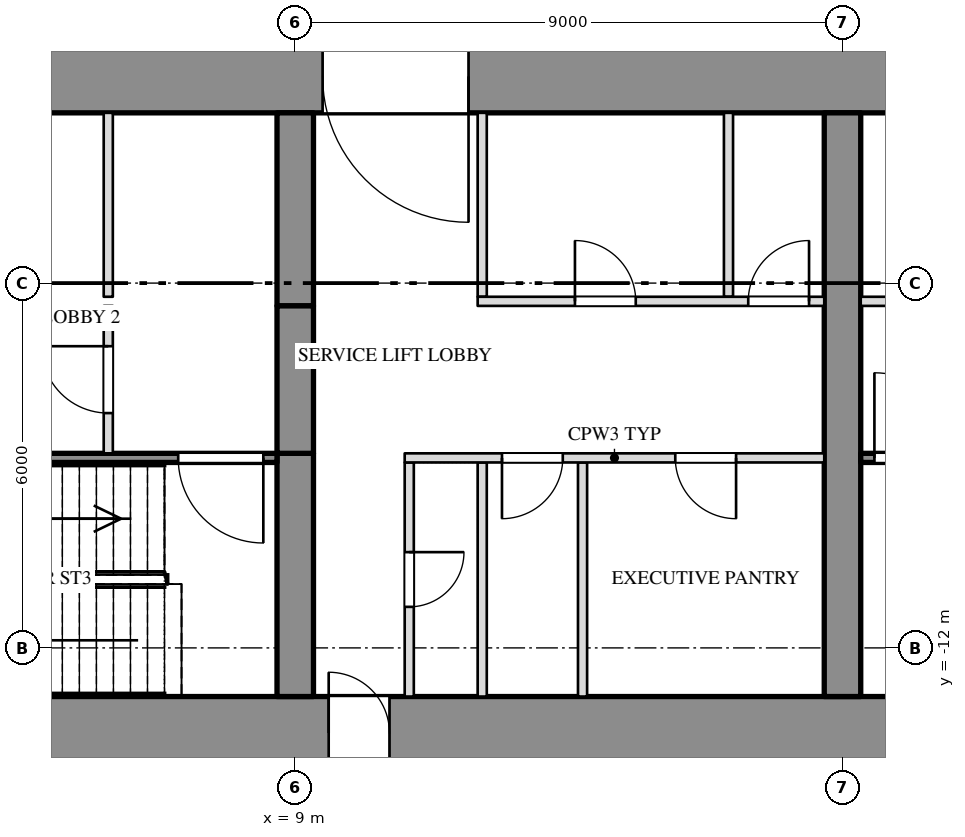
"""IFC4 building model, lengths in metres.
Left out: names, types, materials, properties, quantities, classifications, styles, units other than length and angle.
Written with IfcOpenShell. Run it as: python <this file> out.ifc"""

import sys

from ifc_helpers import new_model, si_unit, direction, frame, frame_2d, origin, place, context, subcontext, project, spatial, rectangle, extrude, element, fill, save


model = new_model("IFC4")
c1 = context("Model", 3, precision=1e-05, world=origin(), true_north=direction((0.0, 1.0)))
c2 = subcontext(c1, "Body", "Model", "MODEL_VIEW")
j1 = project(units=[si_unit("LENGTHUNIT", "METRE"), si_unit("PLANEANGLEUNIT", "RADIAN")], contexts=[c1])
p1 = place(None, origin())
s1 = spatial("IfcSite", under=j1, at=p1, CompositionType="ELEMENT")
p2 = place(p1, origin())
s2 = spatial("IfcBuilding", under=s1, at=p2, CompositionType="ELEMENT")
p3 = place(p2, frame((0.0, 0.0, 39.0)))
s3 = spatial("IfcBuildingStorey", under=s2, at=p3, CompositionType="ELEMENT", Elevation=39.0)
p4 = place(p3, frame((-27.0, -2.6, 0.0), z_axis=(0.0, 0.0, 1.0), x_axis=(1.0, 0.0, 0.0)))
e1 = element("IfcWall", 1, at=p4, inside=s3, PredefinedType="SHEAR", context=c2, shape_type="SweptSolid", body=[
    extrude(rectangle(XDim=54.0, YDim=1.2, at=frame_2d((27.0, 0.0))), origin(), (0.0, 0.0, 1.0), 4.25),
])
p5 = place(p4, frame((15.15, 0.0, 0.0)))
e2 = element("IfcOpeningElement", 2, at=p5, cuts=e1, PredefinedType="OPENING", context=c2, shape_type="SweptSolid", body=[
    extrude(rectangle(XDim=2.4, YDim=2.1, at=frame_2d((1.2, 1.05))), frame((0.0, 0.612, 0.0), z_axis=(0.0, -1.0, 0.0), x_axis=(1.0, 0.0, 0.0)), (0.0, 0.0, 1.0), 1.224),
])
p6 = place(p4, frame((36.45, 0.0, 0.0)))
e3 = element("IfcOpeningElement", 3, at=p6, cuts=e1, PredefinedType="OPENING", context=c2, shape_type="SweptSolid", body=[
    extrude(rectangle(XDim=2.4, YDim=2.1, at=frame_2d((1.2, 1.05))), frame((0.0, 0.612, 0.0), z_axis=(0.0, -1.0, 0.0), x_axis=(1.0, 0.0, 0.0)), (0.0, 0.0, 1.0), 1.224),
])
p7 = place(p3, frame((-27.0, -13.4, 0.0), z_axis=(0.0, 0.0, 1.0), x_axis=(1.0, 0.0, 0.0)))
e4 = element("IfcWall", 4, at=p7, inside=s3, PredefinedType="SHEAR", context=c2, shape_type="SweptSolid", body=[
    extrude(rectangle(XDim=54.0, YDim=1.2, at=frame_2d((27.0, 0.0))), origin(), (0.0, 0.0, 1.0), 4.25),
])
p8 = place(p7, frame((16.45, 0.0, 0.0)))
e5 = element("IfcOpeningElement", 5, at=p8, cuts=e4, PredefinedType="OPENING", context=c2, shape_type="SweptSolid", body=[
    extrude(rectangle(XDim=1.0, YDim=2.1, at=frame_2d((0.5, 1.05))), frame((0.0, 0.612, 0.0), z_axis=(0.0, -1.0, 0.0), x_axis=(1.0, 0.0, 0.0)), (0.0, 0.0, 1.0), 1.224),
])
p9 = place(p7, frame((36.55, 0.0, 0.0)))
e6 = element("IfcOpeningElement", 6, at=p9, cuts=e4, PredefinedType="OPENING", context=c2, shape_type="SweptSolid", body=[
    extrude(rectangle(XDim=1.0, YDim=2.1, at=frame_2d((0.5, 1.05))), frame((0.0, 0.612, 0.0), z_axis=(0.0, -1.0, 0.0), x_axis=(1.0, 0.0, 0.0)), (0.0, 0.0, 1.0), 1.224),
])
p10 = place(p3, frame((9.0, -12.8, 0.0), z_axis=(0.0, 0.0, 1.0), x_axis=(0.0, 1.0, 0.0)))
e7 = element("IfcWall", 7, at=p10, inside=s3, PredefinedType="SHEAR", context=c2, shape_type="SweptSolid", body=[
    extrude(rectangle(XDim=4.0, YDim=0.6, at=frame_2d((2.0, 0.0))), origin(), (0.0, 0.0, 1.0), 4.25),
])
p11 = place(p3, frame((9.0, -6.375, 0.0), z_axis=(0.0, 0.0, 1.0), x_axis=(0.0, 1.0, 0.0)))
e8 = element("IfcWall", 8, at=p11, inside=s3, PredefinedType="SHEAR", context=c2, shape_type="SweptSolid", body=[
    extrude(rectangle(XDim=3.175, YDim=0.6, at=frame_2d((1.587, 0.0))), origin(), (0.0, 0.0, 1.0), 4.25),
])
p12 = place(p3, frame((9.0, -8.8, 3.6), z_axis=(0.0, 0.0, 1.0), x_axis=(0.0, 1.0, 0.0)))
e9 = element("IfcWall", 9, at=p12, inside=s3, PredefinedType="SHEAR", context=c2, shape_type="SweptSolid", body=[
    extrude(rectangle(XDim=2.425, YDim=0.6, at=frame_2d((1.212, 0.0))), origin(), (0.0, 0.0, 1.0), 0.65),
])
p13 = place(p3, frame((18.0, -12.8, 0.0), z_axis=(0.0, 0.0, 1.0), x_axis=(0.0, 1.0, 0.0)))
e10 = element("IfcWall", 10, at=p13, inside=s3, PredefinedType="SHEAR", context=c2, shape_type="SweptSolid", body=[
    extrude(rectangle(XDim=9.6, YDim=0.6, at=frame_2d((4.8, 0.0))), origin(), (0.0, 0.0, 1.0), 4.25),
])
for number, where, z_axis, x_axis in (
    (11, (5.925, -6.225, 0.0), (0.0, 0.0, 1.0), (0.0, 1.0, 0.0)),
    (12, (12.075, -6.225, 0.0), (0.0, 0.0, 1.0), (0.0, 1.0, 0.0)),
    (13, (16.125, -6.225, 0.0), (0.0, 0.0, 1.0), (0.0, 1.0, 0.0)),
):
    element("IfcWall", number, at=place(p3, frame(where, z_axis=z_axis, x_axis=x_axis)), inside=s3, PredefinedType="PARTITIONING", context=c2, shape_type="SweptSolid", body=[
        extrude(rectangle(XDim=3.025, YDim=0.15, at=frame_2d((1.513, 0.0))), origin(), (0.0, 0.0, 1.0), 4.25),
    ])
p14 = place(p3, frame((10.875, -12.8, 0.0), z_axis=(0.0, 0.0, 1.0), x_axis=(0.0, 1.0, 0.0)))
e14 = element("IfcWall", 14, at=p14, inside=s3, PredefinedType="PARTITIONING", context=c2, shape_type="SweptSolid", body=[
    extrude(rectangle(XDim=3.85, YDim=0.15, at=frame_2d((1.925, 0.0))), origin(), (0.0, 0.0, 1.0), 4.25),
])
p15 = place(p14, frame((1.475, 0.0, 0.0)))
e15 = element("IfcOpeningElement", 15, at=p15, cuts=e14, PredefinedType="OPENING", context=c2, shape_type="SweptSolid", body=[
    extrude(rectangle(XDim=0.9, YDim=2.1, at=frame_2d((0.45, 1.05))), frame((0.0, 0.087, 0.0), z_axis=(0.0, -1.0, 0.0), x_axis=(1.0, 0.0, 0.0)), (0.0, 0.0, 1.0), 0.174),
])
for number, where, z_axis, x_axis in (
    (16, (12.075, -12.8, 0.0), (0.0, 0.0, 1.0), (0.0, 1.0, 0.0)),
    (17, (13.725, -12.8, 0.0), (0.0, 0.0, 1.0), (0.0, 1.0, 0.0)),
):
    element("IfcWall", number, at=place(p3, frame(where, z_axis=z_axis, x_axis=x_axis)), inside=s3, PredefinedType="PARTITIONING", context=c2, shape_type="SweptSolid", body=[
        extrude(rectangle(XDim=3.85, YDim=0.15, at=frame_2d((1.925, 0.0))), origin(), (0.0, 0.0, 1.0), 4.25),
    ])
p16 = place(p3, frame((5.925, -8.8, 0.0), z_axis=(0.0, 0.0, 1.0), x_axis=(0.0, 1.0, 0.0)))
e18 = element("IfcWall", 18, at=p16, inside=s3, PredefinedType="PARTITIONING", context=c2, shape_type="SweptSolid", body=[
    extrude(rectangle(XDim=2.425, YDim=0.15, at=frame_2d((1.212, 0.0))), origin(), (0.0, 0.0, 1.0), 4.25),
])
p17 = place(p16, frame((0.662, 0.0, 0.0)))
e19 = element("IfcOpeningElement", 19, at=p17, cuts=e18, PredefinedType="OPENING", context=c2, shape_type="SweptSolid", body=[
    extrude(rectangle(XDim=1.1, YDim=2.1, at=frame_2d((0.55, 1.05))), frame((0.0, 0.087, 0.0), z_axis=(0.0, -1.0, 0.0), x_axis=(1.0, 0.0, 0.0)), (0.0, 0.0, 1.0), 0.174),
])
p18 = place(p3, frame((12.0, -6.3, 0.0), z_axis=(0.0, 0.0, 1.0), x_axis=(1.0, 0.0, 0.0)))
e20 = element("IfcWall", 20, at=p18, inside=s3, PredefinedType="PARTITIONING", context=c2, shape_type="SweptSolid", body=[
    extrude(rectangle(XDim=5.7, YDim=0.15, at=frame_2d((2.85, 0.0))), origin(), (0.0, 0.0, 1.0), 4.25),
])
p19 = place(p18, frame((1.6, 0.0, 0.0)))
e21 = element("IfcOpeningElement", 21, at=p19, cuts=e20, PredefinedType="OPENING", context=c2, shape_type="SweptSolid", body=[
    extrude(rectangle(XDim=1.0, YDim=2.1, at=frame_2d((0.5, 1.05))), frame((0.0, 0.087, 0.0), z_axis=(0.0, -1.0, 0.0), x_axis=(1.0, 0.0, 0.0)), (0.0, 0.0, 1.0), 0.174),
])
p20 = place(p18, frame((4.45, 0.0, 0.0)))
e22 = element("IfcOpeningElement", 22, at=p20, cuts=e20, PredefinedType="OPENING", context=c2, shape_type="SweptSolid", body=[
    extrude(rectangle(XDim=1.0, YDim=2.1, at=frame_2d((0.5, 1.05))), frame((0.0, 0.087, 0.0), z_axis=(0.0, -1.0, 0.0), x_axis=(1.0, 0.0, 0.0)), (0.0, 0.0, 1.0), 0.174),
])
p21 = place(p3, frame((18.3, -6.3, 0.0), z_axis=(0.0, 0.0, 1.0), x_axis=(1.0, 0.0, 0.0)))
e23 = element("IfcWall", 23, at=p21, inside=s3, PredefinedType="PARTITIONING", context=c2, shape_type="SweptSolid", body=[
    extrude(rectangle(XDim=5.1, YDim=0.15, at=frame_2d((2.55, 0.0))), origin(), (0.0, 0.0, 1.0), 4.25),
])
p22 = place(p3, frame((0.3, -8.875, 0.0), z_axis=(0.0, 0.0, 1.0), x_axis=(1.0, 0.0, 0.0)))
e24 = element("IfcWall", 24, at=p22, inside=s3, PredefinedType="SHEAR", context=c2, shape_type="SweptSolid", body=[
    extrude(rectangle(XDim=8.4, YDim=0.15, at=frame_2d((4.2, 0.0))), origin(), (0.0, 0.0, 1.0), 4.25),
])
p23 = place(p22, frame((6.775, 0.0, 0.0)))
e25 = element("IfcOpeningElement", 25, at=p23, cuts=e24, PredefinedType="OPENING", context=c2, shape_type="SweptSolid", body=[
    extrude(rectangle(XDim=1.4, YDim=2.1, at=frame_2d((0.7, 1.05))), frame((0.0, 0.087, 0.0), z_axis=(0.0, -1.0, 0.0), x_axis=(1.0, 0.0, 0.0)), (0.0, 0.0, 1.0), 0.174),
])
p24 = place(p3, frame((10.8, -8.875, 0.0), z_axis=(0.0, 0.0, 1.0), x_axis=(1.0, 0.0, 0.0)))
e26 = element("IfcWall", 26, at=p24, inside=s3, PredefinedType="PARTITIONING", context=c2, shape_type="SweptSolid", body=[
    extrude(rectangle(XDim=6.9, YDim=0.15, at=frame_2d((3.45, 0.0))), origin(), (0.0, 0.0, 1.0), 4.25),
])
p25 = place(p24, frame((1.6, 0.0, 0.0)))
e27 = element("IfcOpeningElement", 27, at=p25, cuts=e26, PredefinedType="OPENING", context=c2, shape_type="SweptSolid", body=[
    extrude(rectangle(XDim=1.0, YDim=2.1, at=frame_2d((0.5, 1.05))), frame((0.0, 0.087, 0.0), z_axis=(0.0, -1.0, 0.0), x_axis=(1.0, 0.0, 0.0)), (0.0, 0.0, 1.0), 0.174),
])
p26 = place(p24, frame((4.45, 0.0, 0.0)))
e28 = element("IfcOpeningElement", 28, at=p26, cuts=e26, PredefinedType="OPENING", context=c2, shape_type="SweptSolid", body=[
    extrude(rectangle(XDim=1.0, YDim=2.1, at=frame_2d((0.5, 1.05))), frame((0.0, 0.087, 0.0), z_axis=(0.0, -1.0, 0.0), x_axis=(1.0, 0.0, 0.0)), (0.0, 0.0, 1.0), 0.174),
])
p27 = place(p3, frame((18.3, -8.875, 0.0), z_axis=(0.0, 0.0, 1.0), x_axis=(1.0, 0.0, 0.0)))
e29 = element("IfcWall", 29, at=p27, inside=s3, PredefinedType="SHEAR", context=c2, shape_type="SweptSolid", body=[
    extrude(rectangle(XDim=7.5, YDim=0.15, at=frame_2d((3.75, 0.0))), origin(), (0.0, 0.0, 1.0), 4.25),
])
p28 = place(p27, frame((0.225, 0.0, 0.0)))
e30 = element("IfcOpeningElement", 30, at=p28, cuts=e29, PredefinedType="OPENING", context=c2, shape_type="SweptSolid", body=[
    extrude(rectangle(XDim=1.4, YDim=2.1, at=frame_2d((0.7, 1.05))), frame((0.0, 0.087, 0.0), z_axis=(0.0, -1.0, 0.0), x_axis=(1.0, 0.0, 0.0)), (0.0, 0.0, 1.0), 0.174),
])
p29 = place(p17, origin())
e31 = element("IfcDoor", 31, at=p29, inside=s3, OperationType="SINGLE_SWING_RIGHT", PredefinedType="DOOR", context=c2, shape_type="SweptSolid", body=[
    extrude(rectangle(XDim=1.1, YDim=2.1, at=frame_2d((0.55, 1.05))), frame((0.0, 0.025, 0.0), z_axis=(0.0, -1.0, 0.0), x_axis=(1.0, 0.0, 0.0)), (0.0, 0.0, 1.0), 0.05),
])
fill(e19, e31)
p30 = place(p23, origin())
e32 = element("IfcDoor", 32, at=p30, inside=s3, OperationType="DOUBLE_DOOR_SINGLE_SWING", PredefinedType="DOOR", context=c2, shape_type="SweptSolid", body=[
    extrude(rectangle(XDim=1.4, YDim=2.1, at=frame_2d((0.7, 1.05))), frame((0.0, 0.025, 0.0), z_axis=(0.0, -1.0, 0.0), x_axis=(1.0, 0.0, 0.0)), (0.0, 0.0, 1.0), 0.05),
])
fill(e25, e32)
p31 = place(p9, origin())
e33 = element("IfcDoor", 33, at=p31, inside=s3, OperationType="SINGLE_SWING_LEFT", PredefinedType="DOOR", context=c2, shape_type="SweptSolid", body=[
    extrude(rectangle(XDim=1.0, YDim=2.1, at=frame_2d((0.5, 1.05))), frame((0.0, 0.025, 0.0), z_axis=(0.0, -1.0, 0.0), x_axis=(1.0, 0.0, 0.0)), (0.0, 0.0, 1.0), 0.05),
])
fill(e6, e33)
p32 = place(p6, origin())
e34 = element("IfcDoor", 34, at=p32, inside=s3, OperationType="DOUBLE_DOOR_SINGLE_SWING", PredefinedType="DOOR", context=c2, shape_type="SweptSolid", body=[
    extrude(rectangle(XDim=2.4, YDim=2.1, at=frame_2d((1.2, 1.05))), frame((0.0, 0.025, 0.0), z_axis=(0.0, -1.0, 0.0), x_axis=(1.0, 0.0, 0.0)), (0.0, 0.0, 1.0), 0.05),
])
fill(e3, e34)
p33 = place(p15, origin())
e35 = element("IfcDoor", 35, at=p33, inside=s3, OperationType="SINGLE_SWING_LEFT", PredefinedType="DOOR", context=c2, shape_type="SweptSolid", body=[
    extrude(rectangle(XDim=0.9, YDim=2.1, at=frame_2d((0.45, 1.05))), frame((0.0, 0.025, 0.0), z_axis=(0.0, -1.0, 0.0), x_axis=(1.0, 0.0, 0.0)), (0.0, 0.0, 1.0), 0.05),
])
fill(e15, e35)
p34 = place(p25, origin())
e36 = element("IfcDoor", 36, at=p34, inside=s3, OperationType="SINGLE_SWING_RIGHT", PredefinedType="DOOR", context=c2, shape_type="SweptSolid", body=[
    extrude(rectangle(XDim=1.0, YDim=2.1, at=frame_2d((0.5, 1.05))), frame((0.0, 0.025, 0.0), z_axis=(0.0, -1.0, 0.0), x_axis=(1.0, 0.0, 0.0)), (0.0, 0.0, 1.0), 0.05),
])
fill(e27, e36)
p35 = place(p19, origin())
e37 = element("IfcDoor", 37, at=p35, inside=s3, OperationType="SINGLE_SWING_LEFT", PredefinedType="DOOR", context=c2, shape_type="SweptSolid", body=[
    extrude(rectangle(XDim=1.0, YDim=2.1, at=frame_2d((0.5, 1.05))), frame((0.0, 0.025, 0.0), z_axis=(0.0, -1.0, 0.0), x_axis=(1.0, 0.0, 0.0)), (0.0, 0.0, 1.0), 0.05),
])
fill(e21, e37)
p36 = place(p26, origin())
e38 = element("IfcDoor", 38, at=p36, inside=s3, OperationType="SINGLE_SWING_LEFT", PredefinedType="DOOR", context=c2, shape_type="SweptSolid", body=[
    extrude(rectangle(XDim=1.0, YDim=2.1, at=frame_2d((0.5, 1.05))), frame((0.0, 0.025, 0.0), z_axis=(0.0, -1.0, 0.0), x_axis=(1.0, 0.0, 0.0)), (0.0, 0.0, 1.0), 0.05),
])
fill(e28, e38)
p37 = place(p20, origin())
e39 = element("IfcDoor", 39, at=p37, inside=s3, OperationType="SINGLE_SWING_RIGHT", PredefinedType="DOOR", context=c2, shape_type="SweptSolid", body=[
    extrude(rectangle(XDim=1.0, YDim=2.1, at=frame_2d((0.5, 1.05))), frame((0.0, 0.025, 0.0), z_axis=(0.0, -1.0, 0.0), x_axis=(1.0, 0.0, 0.0)), (0.0, 0.0, 1.0), 0.05),
])
fill(e22, e39)
p38 = place(p28, origin())
e40 = element("IfcDoor", 40, at=p38, inside=s3, OperationType="DOUBLE_DOOR_SINGLE_SWING", PredefinedType="DOOR", context=c2, shape_type="SweptSolid", body=[
    extrude(rectangle(XDim=1.4, YDim=2.1, at=frame_2d((0.7, 1.05))), frame((0.0, 0.025, 0.0), z_axis=(0.0, -1.0, 0.0), x_axis=(1.0, 0.0, 0.0)), (0.0, 0.0, 1.0), 0.05),
])
fill(e30, e40)
save(model, sys.argv[1])
